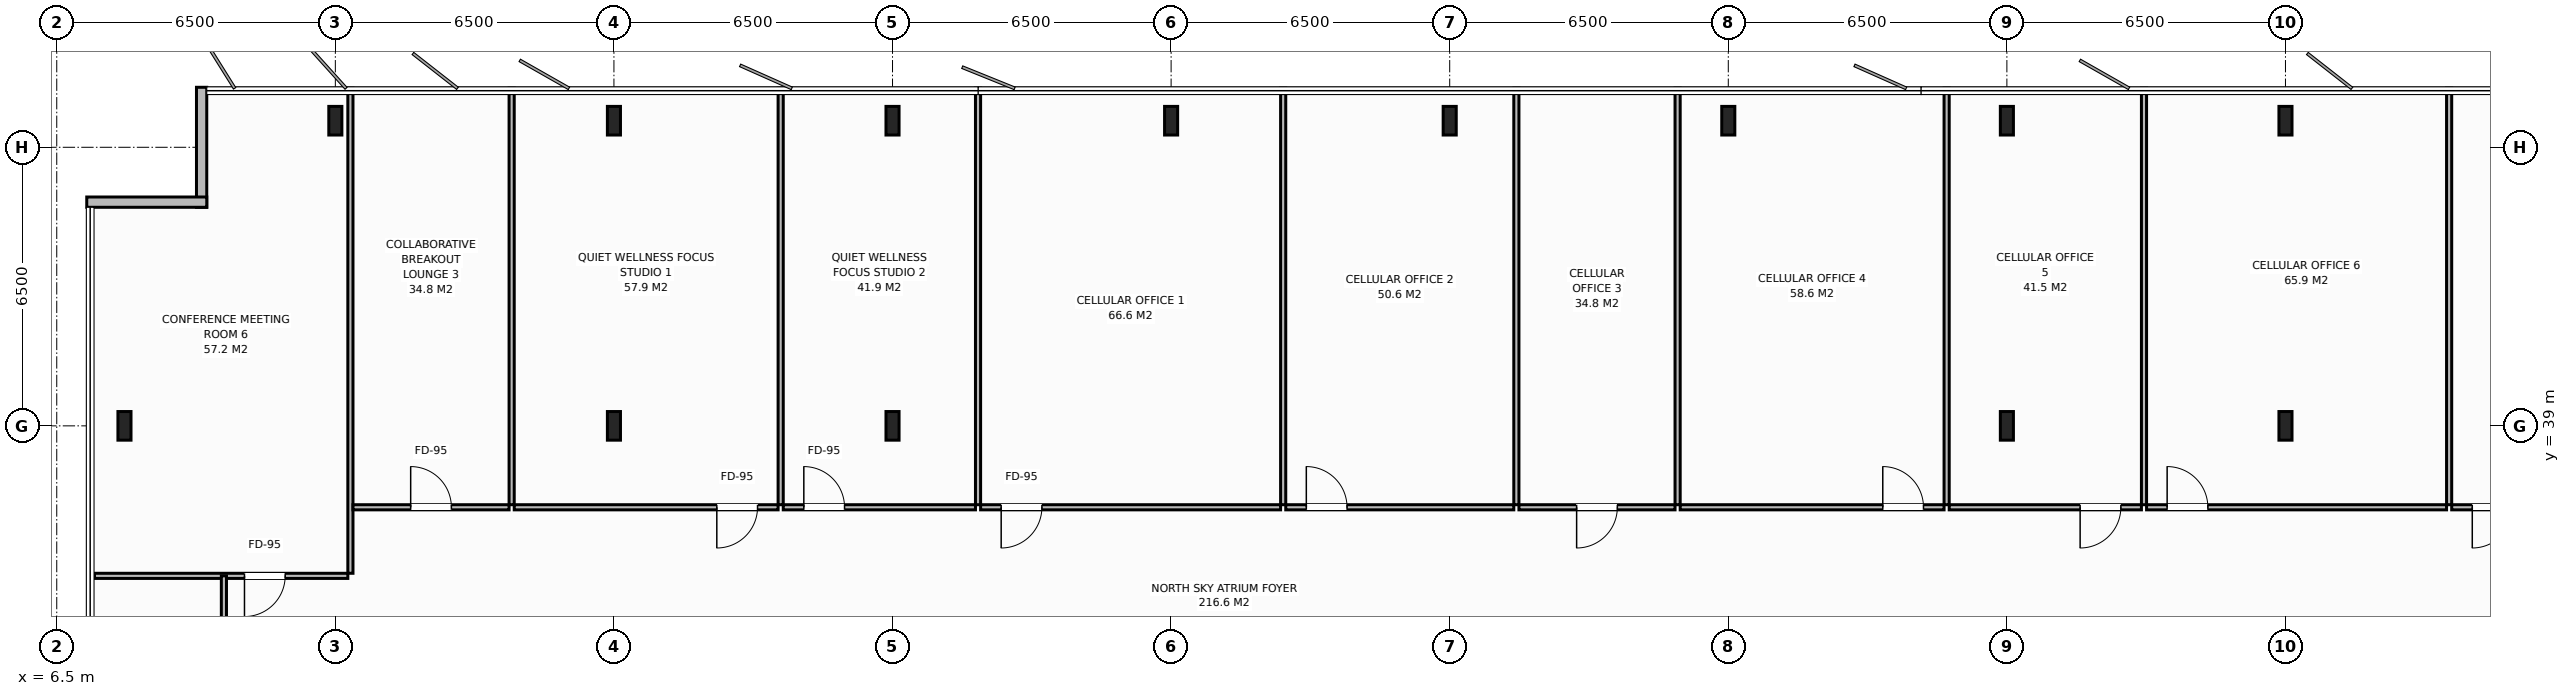
"""IFC4 building model, lengths in metres.
Left out: names, types, materials, properties, quantities, classifications, styles, units other than length and angle.
Written with IfcOpenShell. Run it as: python <this file> out.ifc"""

import sys

from ifc_helpers import new_model, si_unit, direction, frame, frame_2d, origin, origin_2d, place, context, subcontext, project, spatial, rectangle, i_section, extrude, element, fill, save


model = new_model("IFC4")
c1 = context("Model", 3, precision=1e-05, world=origin(), true_north=direction((0.0, 1.0)))
c2 = subcontext(c1, "Body", "Model", "MODEL_VIEW")
j1 = project(units=[si_unit("LENGTHUNIT", "METRE"), si_unit("PLANEANGLEUNIT", "RADIAN")], contexts=[c1])
p1 = place(None, origin())
s1 = spatial("IfcSite", under=j1, at=p1, CompositionType="ELEMENT")
p2 = place(p1, origin())
s2 = spatial("IfcBuilding", under=s1, at=p2, CompositionType="ELEMENT")
p3 = place(p2, frame((0.0, 0.0, 298.4)))
s3 = spatial("IfcBuildingStorey", under=s2, at=p3, CompositionType="ELEMENT", Elevation=298.4)
for number, where, z_axis, x_axis in (
    (1, (19.5, 39.0, 0.0), (0.0, 0.0, 1.0), (1.0, 0.0, 0.0)),
    (2, (58.5, 39.0, 0.0), (0.0, 0.0, 1.0), (1.0, 0.0, 0.0)),
    (3, (26.0, 39.0, 0.0), (0.0, 0.0, 1.0), (1.0, 0.0, 0.0)),
    (4, (52.0, 39.0, 0.0), (0.0, 0.0, 1.0), (1.0, 0.0, 0.0)),
    (5, (13.0, 46.12, 0.0), (0.0, 0.0, 1.0), (1.0, 0.0, 0.0)),
    (6, (19.5, 46.12, 0.0), (0.0, 0.0, 1.0), (1.0, 0.0, 0.0)),
    (7, (26.0, 46.12, 0.0), (0.0, 0.0, 1.0), (1.0, 0.0, 0.0)),
    (8, (32.5, 46.12, 0.0), (0.0, 0.0, 1.0), (1.0, 0.0, 0.0)),
    (9, (39.0, 46.12, 0.0), (0.0, 0.0, 1.0), (1.0, 0.0, 0.0)),
    (10, (45.5, 46.12, 0.0), (0.0, 0.0, 1.0), (1.0, 0.0, 0.0)),
    (11, (52.0, 46.12, 0.0), (0.0, 0.0, 1.0), (1.0, 0.0, 0.0)),
    (12, (58.5, 46.12, 0.0), (0.0, 0.0, 1.0), (1.0, 0.0, 0.0)),
    (13, (8.08, 39.0, 0.0), (0.0, 0.0, 1.0), (1.0, 0.0, 0.0)),
):
    element("IfcColumn", number, at=place(p3, frame(where, z_axis=z_axis, x_axis=x_axis)), inside=s3, PredefinedType="COLUMN", context=c2, shape_type="SweptSolid", body=[
        extrude(i_section(OverallWidth=0.305, OverallDepth=0.668, WebThickness=0.021, FlangeThickness=0.04, at=origin_2d()), origin(), (0.0, 0.0, 1.0), 4.0),
    ])
p4 = place(p3, frame((9.88, 44.1, 0.0), z_axis=(0.0, 0.0, 1.0), x_axis=(0.0, 1.0, 0.0)))
e14 = element("IfcWall", 14, at=p4, inside=s3, PredefinedType="STANDARD", context=c2, shape_type="SweptSolid", body=[
    extrude(rectangle(XDim=2.8, YDim=0.24, at=frame_2d((1.4, 0.0))), origin(), (0.0, 0.0, 1.0), 3.788),
])
p5 = place(p3, frame((7.2, 44.22, 0.0), z_axis=(0.0, 0.0, 1.0), x_axis=(1.0, 0.0, 0.0)))
e15 = element("IfcWall", 15, at=p5, inside=s3, PredefinedType="STANDARD", context=c2, shape_type="SweptSolid", body=[
    extrude(rectangle(XDim=2.8, YDim=0.24, at=frame_2d((1.4, 0.0))), origin(), (0.0, 0.0, 1.0), 3.788),
])
p6 = place(p3, frame((13.352, 35.56, 0.0), z_axis=(0.0, 0.0, 1.0), x_axis=(0.0, 1.0, 0.0)))
e16 = element("IfcWall", 16, at=p6, inside=s3, PredefinedType="PARTITIONING", context=c2, shape_type="SweptSolid", body=[
    extrude(rectangle(XDim=11.32, YDim=0.12, at=frame_2d((5.66, 0.0))), origin(), (0.0, 0.0, 1.0), 3.788),
])
p7 = place(p3, frame((7.38, 35.5, 0.0), z_axis=(0.0, 0.0, 1.0), x_axis=(1.0, 0.0, 0.0)))
e17 = element("IfcWall", 17, at=p7, inside=s3, PredefinedType="PARTITIONING", context=c2, shape_type="SweptSolid", body=[
    extrude(rectangle(XDim=5.912, YDim=0.12, at=frame_2d((2.956, 0.0))), origin(), (0.0, 0.0, 1.0), 3.788),
])
p8 = place(p7, frame((3.5, 0.0, 0.0)))
e18 = element("IfcOpeningElement", 18, at=p8, cuts=e17, PredefinedType="OPENING", context=c2, shape_type="SweptSolid", body=[
    extrude(rectangle(XDim=0.95, YDim=2.15, at=frame_2d((0.475, 1.075))), frame((0.0, 0.07, 0.0), z_axis=(0.0, -1.0, 0.0), x_axis=(1.0, 0.0, 0.0)), (0.0, 0.0, 1.0), 0.14),
])
p9 = place(p3, frame((17.114, 37.16, 0.0), z_axis=(0.0, 0.0, 1.0), x_axis=(0.0, 1.0, 0.0)))
e19 = element("IfcWall", 19, at=p9, inside=s3, PredefinedType="PARTITIONING", context=c2, shape_type="SweptSolid", body=[
    extrude(rectangle(XDim=9.72, YDim=0.12, at=frame_2d((4.86, 0.0))), origin(), (0.0, 0.0, 1.0), 3.788),
])
p10 = place(p3, frame((13.412, 37.1, 0.0), z_axis=(0.0, 0.0, 1.0), x_axis=(1.0, 0.0, 0.0)))
e20 = element("IfcWall", 20, at=p10, inside=s3, PredefinedType="PARTITIONING", context=c2, shape_type="SweptSolid", body=[
    extrude(rectangle(XDim=3.642, YDim=0.12, at=frame_2d((1.821, 0.0))), origin(), (0.0, 0.0, 1.0), 3.788),
])
p11 = place(p10, frame((1.346, 0.0, 0.0)))
e21 = element("IfcOpeningElement", 21, at=p11, cuts=e20, PredefinedType="OPENING", context=c2, shape_type="SweptSolid", body=[
    extrude(rectangle(XDim=0.95, YDim=2.15, at=frame_2d((0.475, 1.075))), frame((0.0, 0.07, 0.0), z_axis=(0.0, -1.0, 0.0), x_axis=(1.0, 0.0, 0.0)), (0.0, 0.0, 1.0), 0.14),
])
p12 = place(p3, frame((23.39, 37.16, 0.0), z_axis=(0.0, 0.0, 1.0), x_axis=(0.0, 1.0, 0.0)))
e22 = element("IfcWall", 22, at=p12, inside=s3, PredefinedType="PARTITIONING", context=c2, shape_type="SweptSolid", body=[
    extrude(rectangle(XDim=9.72, YDim=0.12, at=frame_2d((4.86, 0.0))), origin(), (0.0, 0.0, 1.0), 3.788),
])
p13 = place(p3, frame((17.174, 37.1, 0.0), z_axis=(0.0, 0.0, 1.0), x_axis=(1.0, 0.0, 0.0)))
e23 = element("IfcWall", 23, at=p13, inside=s3, PredefinedType="PARTITIONING", context=c2, shape_type="SweptSolid", body=[
    extrude(rectangle(XDim=6.157, YDim=0.12, at=frame_2d((3.079, 0.0))), origin(), (0.0, 0.0, 1.0), 3.788),
])
p14 = place(p13, frame((4.727, 0.0, 0.0)))
e24 = element("IfcOpeningElement", 24, at=p14, cuts=e23, PredefinedType="OPENING", context=c2, shape_type="SweptSolid", body=[
    extrude(rectangle(XDim=0.95, YDim=2.15, at=frame_2d((0.475, 1.075))), frame((0.0, 0.07, 0.0), z_axis=(0.0, -1.0, 0.0), x_axis=(1.0, 0.0, 0.0)), (0.0, 0.0, 1.0), 0.14),
])
p15 = place(p3, frame((27.995, 37.16, 0.0), z_axis=(0.0, 0.0, 1.0), x_axis=(0.0, 1.0, 0.0)))
e25 = element("IfcWall", 25, at=p15, inside=s3, PredefinedType="PARTITIONING", context=c2, shape_type="SweptSolid", body=[
    extrude(rectangle(XDim=9.72, YDim=0.12, at=frame_2d((4.86, 0.0))), origin(), (0.0, 0.0, 1.0), 3.788),
])
p16 = place(p3, frame((23.45, 37.1, 0.0), z_axis=(0.0, 0.0, 1.0), x_axis=(1.0, 0.0, 0.0)))
e26 = element("IfcWall", 26, at=p16, inside=s3, PredefinedType="PARTITIONING", context=c2, shape_type="SweptSolid", body=[
    extrude(rectangle(XDim=4.485, YDim=0.12, at=frame_2d((2.242, 0.0))), origin(), (0.0, 0.0, 1.0), 3.788),
])
p17 = place(p16, frame((0.48, 0.0, 0.0)))
e27 = element("IfcOpeningElement", 27, at=p17, cuts=e26, PredefinedType="OPENING", context=c2, shape_type="SweptSolid", body=[
    extrude(rectangle(XDim=0.95, YDim=2.15, at=frame_2d((0.475, 1.075))), frame((0.0, 0.07, 0.0), z_axis=(0.0, -1.0, 0.0), x_axis=(1.0, 0.0, 0.0)), (0.0, 0.0, 1.0), 0.14),
])
p18 = place(p3, frame((35.115, 37.16, 0.0), z_axis=(0.0, 0.0, 1.0), x_axis=(0.0, 1.0, 0.0)))
e28 = element("IfcWall", 28, at=p18, inside=s3, PredefinedType="PARTITIONING", context=c2, shape_type="SweptSolid", body=[
    extrude(rectangle(XDim=9.72, YDim=0.12, at=frame_2d((4.86, 0.0))), origin(), (0.0, 0.0, 1.0), 3.788),
])
p19 = place(p3, frame((28.055, 37.1, 0.0), z_axis=(0.0, 0.0, 1.0), x_axis=(1.0, 0.0, 0.0)))
e29 = element("IfcWall", 29, at=p19, inside=s3, PredefinedType="PARTITIONING", context=c2, shape_type="SweptSolid", body=[
    extrude(rectangle(XDim=6.999, YDim=0.12, at=frame_2d((3.5, 0.0))), origin(), (0.0, 0.0, 1.0), 3.788),
])
p20 = place(p19, frame((0.48, 0.0, 0.0)))
e30 = element("IfcOpeningElement", 30, at=p20, cuts=e29, PredefinedType="OPENING", context=c2, shape_type="SweptSolid", body=[
    extrude(rectangle(XDim=0.95, YDim=2.15, at=frame_2d((0.475, 1.075))), frame((0.0, 0.07, 0.0), z_axis=(0.0, -1.0, 0.0), x_axis=(1.0, 0.0, 0.0)), (0.0, 0.0, 1.0), 0.14),
])
p21 = place(p3, frame((40.555, 37.16, 0.0), z_axis=(0.0, 0.0, 1.0), x_axis=(0.0, 1.0, 0.0)))
e31 = element("IfcWall", 31, at=p21, inside=s3, PredefinedType="PARTITIONING", context=c2, shape_type="SweptSolid", body=[
    extrude(rectangle(XDim=9.72, YDim=0.12, at=frame_2d((4.86, 0.0))), origin(), (0.0, 0.0, 1.0), 3.788),
])
p22 = place(p3, frame((35.175, 37.1, 0.0), z_axis=(0.0, 0.0, 1.0), x_axis=(1.0, 0.0, 0.0)))
e32 = element("IfcWall", 32, at=p22, inside=s3, PredefinedType="PARTITIONING", context=c2, shape_type="SweptSolid", body=[
    extrude(rectangle(XDim=5.321, YDim=0.12, at=frame_2d((2.66, 0.0))), origin(), (0.0, 0.0, 1.0), 3.788),
])
p23 = place(p22, frame((0.48, 0.0, 0.0)))
e33 = element("IfcOpeningElement", 33, at=p23, cuts=e32, PredefinedType="OPENING", context=c2, shape_type="SweptSolid", body=[
    extrude(rectangle(XDim=0.95, YDim=2.15, at=frame_2d((0.475, 1.075))), frame((0.0, 0.07, 0.0), z_axis=(0.0, -1.0, 0.0), x_axis=(1.0, 0.0, 0.0)), (0.0, 0.0, 1.0), 0.14),
])
p24 = place(p3, frame((44.318, 37.16, 0.0), z_axis=(0.0, 0.0, 1.0), x_axis=(0.0, 1.0, 0.0)))
e34 = element("IfcWall", 34, at=p24, inside=s3, PredefinedType="PARTITIONING", context=c2, shape_type="SweptSolid", body=[
    extrude(rectangle(XDim=9.72, YDim=0.12, at=frame_2d((4.86, 0.0))), origin(), (0.0, 0.0, 1.0), 3.788),
])
p25 = place(p3, frame((40.615, 37.1, 0.0), z_axis=(0.0, 0.0, 1.0), x_axis=(1.0, 0.0, 0.0)))
e35 = element("IfcWall", 35, at=p25, inside=s3, PredefinedType="PARTITIONING", context=c2, shape_type="SweptSolid", body=[
    extrude(rectangle(XDim=3.642, YDim=0.12, at=frame_2d((1.821, 0.0))), origin(), (0.0, 0.0, 1.0), 3.788),
])
p26 = place(p25, frame((1.346, 0.0, 0.0)))
e36 = element("IfcOpeningElement", 36, at=p26, cuts=e35, PredefinedType="OPENING", context=c2, shape_type="SweptSolid", body=[
    extrude(rectangle(XDim=0.95, YDim=2.15, at=frame_2d((0.475, 1.075))), frame((0.0, 0.07, 0.0), z_axis=(0.0, -1.0, 0.0), x_axis=(1.0, 0.0, 0.0)), (0.0, 0.0, 1.0), 0.14),
])
p27 = place(p3, frame((50.594, 37.16, 0.0), z_axis=(0.0, 0.0, 1.0), x_axis=(0.0, 1.0, 0.0)))
e37 = element("IfcWall", 37, at=p27, inside=s3, PredefinedType="PARTITIONING", context=c2, shape_type="SweptSolid", body=[
    extrude(rectangle(XDim=9.72, YDim=0.12, at=frame_2d((4.86, 0.0))), origin(), (0.0, 0.0, 1.0), 3.788),
])
p28 = place(p3, frame((44.378, 37.1, 0.0), z_axis=(0.0, 0.0, 1.0), x_axis=(1.0, 0.0, 0.0)))
e38 = element("IfcWall", 38, at=p28, inside=s3, PredefinedType="PARTITIONING", context=c2, shape_type="SweptSolid", body=[
    extrude(rectangle(XDim=6.157, YDim=0.12, at=frame_2d((3.078, 0.0))), origin(), (0.0, 0.0, 1.0), 3.788),
])
p29 = place(p28, frame((4.727, 0.0, 0.0)))
e39 = element("IfcOpeningElement", 39, at=p29, cuts=e38, PredefinedType="OPENING", context=c2, shape_type="SweptSolid", body=[
    extrude(rectangle(XDim=0.95, YDim=2.15, at=frame_2d((0.475, 1.075))), frame((0.0, 0.07, 0.0), z_axis=(0.0, -1.0, 0.0), x_axis=(1.0, 0.0, 0.0)), (0.0, 0.0, 1.0), 0.14),
])
p30 = place(p3, frame((55.199, 37.16, 0.0), z_axis=(0.0, 0.0, 1.0), x_axis=(0.0, 1.0, 0.0)))
e40 = element("IfcWall", 40, at=p30, inside=s3, PredefinedType="PARTITIONING", context=c2, shape_type="SweptSolid", body=[
    extrude(rectangle(XDim=9.72, YDim=0.12, at=frame_2d((4.86, 0.0))), origin(), (0.0, 0.0, 1.0), 3.788),
])
p31 = place(p3, frame((50.654, 37.1, 0.0), z_axis=(0.0, 0.0, 1.0), x_axis=(1.0, 0.0, 0.0)))
e41 = element("IfcWall", 41, at=p31, inside=s3, PredefinedType="PARTITIONING", context=c2, shape_type="SweptSolid", body=[
    extrude(rectangle(XDim=4.485, YDim=0.12, at=frame_2d((2.242, 0.0))), origin(), (0.0, 0.0, 1.0), 3.788),
])
p32 = place(p31, frame((3.055, 0.0, 0.0)))
e42 = element("IfcOpeningElement", 42, at=p32, cuts=e41, PredefinedType="OPENING", context=c2, shape_type="SweptSolid", body=[
    extrude(rectangle(XDim=0.95, YDim=2.15, at=frame_2d((0.475, 1.075))), frame((0.0, 0.07, 0.0), z_axis=(0.0, -1.0, 0.0), x_axis=(1.0, 0.0, 0.0)), (0.0, 0.0, 1.0), 0.14),
])
p33 = place(p3, frame((62.319, 37.16, 0.0), z_axis=(0.0, 0.0, 1.0), x_axis=(0.0, 1.0, 0.0)))
e43 = element("IfcWall", 43, at=p33, inside=s3, PredefinedType="PARTITIONING", context=c2, shape_type="SweptSolid", body=[
    extrude(rectangle(XDim=9.72, YDim=0.12, at=frame_2d((4.86, 0.0))), origin(), (0.0, 0.0, 1.0), 3.788),
])
p34 = place(p3, frame((55.259, 37.1, 0.0), z_axis=(0.0, 0.0, 1.0), x_axis=(1.0, 0.0, 0.0)))
e44 = element("IfcWall", 44, at=p34, inside=s3, PredefinedType="PARTITIONING", context=c2, shape_type="SweptSolid", body=[
    extrude(rectangle(XDim=6.999, YDim=0.12, at=frame_2d((3.5, 0.0))), origin(), (0.0, 0.0, 1.0), 3.788),
])
p35 = place(p34, frame((0.48, 0.0, 0.0)))
e45 = element("IfcOpeningElement", 45, at=p35, cuts=e44, PredefinedType="OPENING", context=c2, shape_type="SweptSolid", body=[
    extrude(rectangle(XDim=0.95, YDim=2.15, at=frame_2d((0.475, 1.075))), frame((0.0, 0.07, 0.0), z_axis=(0.0, -1.0, 0.0), x_axis=(1.0, 0.0, 0.0)), (0.0, 0.0, 1.0), 0.14),
])
p36 = place(p3, frame((62.379, 37.1, 0.0), z_axis=(0.0, 0.0, 1.0), x_axis=(1.0, 0.0, 0.0)))
e46 = element("IfcWall", 46, at=p36, inside=s3, PredefinedType="PARTITIONING", context=c2, shape_type="SweptSolid", body=[
    extrude(rectangle(XDim=5.321, YDim=0.12, at=frame_2d((2.66, 0.0))), origin(), (0.0, 0.0, 1.0), 3.788),
])
p37 = place(p36, frame((0.48, 0.0, 0.0)))
e47 = element("IfcOpeningElement", 47, at=p37, cuts=e46, PredefinedType="OPENING", context=c2, shape_type="SweptSolid", body=[
    extrude(rectangle(XDim=0.95, YDim=2.15, at=frame_2d((0.475, 1.075))), frame((0.0, 0.07, 0.0), z_axis=(0.0, -1.0, 0.0), x_axis=(1.0, 0.0, 0.0)), (0.0, 0.0, 1.0), 0.14),
])
p38 = place(p3, frame((10.4, 29.167, 0.0), z_axis=(0.0, 0.0, 1.0), x_axis=(0.0, 1.0, 0.0)))
e48 = element("IfcWall", 48, at=p38, inside=s3, PredefinedType="PARTITIONING", context=c2, shape_type="SweptSolid", body=[
    extrude(rectangle(XDim=6.333, YDim=0.12, at=frame_2d((3.167, 0.0))), origin(), (0.0, 0.0, 1.0), 3.788),
])
p39 = place(p38, frame((1.642, 0.0, 0.0)))
e49 = element("IfcOpeningElement", 49, at=p39, cuts=e48, PredefinedType="OPENING", context=c2, shape_type="SweptSolid", body=[
    extrude(rectangle(XDim=0.95, YDim=2.15, at=frame_2d((0.475, 1.075))), frame((0.0, 0.07, 0.0), z_axis=(0.0, -1.0, 0.0), x_axis=(1.0, 0.0, 0.0)), (0.0, 0.0, 1.0), 0.14),
])
p40 = place(p8, origin())
e50 = element("IfcDoor", 50, at=p40, inside=s3, OperationType="SINGLE_SWING_RIGHT", PredefinedType="DOOR", context=c2, shape_type="SweptSolid", body=[
    extrude(rectangle(XDim=0.95, YDim=2.15, at=frame_2d((0.475, 1.075))), frame((0.0, 0.025, 0.0), z_axis=(0.0, -1.0, 0.0), x_axis=(1.0, 0.0, 0.0)), (0.0, 0.0, 1.0), 0.05),
])
fill(e18, e50)
p41 = place(p11, origin())
e51 = element("IfcDoor", 51, at=p41, inside=s3, OperationType="SINGLE_SWING_LEFT", PredefinedType="DOOR", context=c2, shape_type="SweptSolid", body=[
    extrude(rectangle(XDim=0.95, YDim=2.15, at=frame_2d((0.475, 1.075))), frame((0.0, 0.025, 0.0), z_axis=(0.0, -1.0, 0.0), x_axis=(1.0, 0.0, 0.0)), (0.0, 0.0, 1.0), 0.05),
])
fill(e21, e51)
p42 = place(p14, origin())
e52 = element("IfcDoor", 52, at=p42, inside=s3, OperationType="SINGLE_SWING_RIGHT", PredefinedType="DOOR", context=c2, shape_type="SweptSolid", body=[
    extrude(rectangle(XDim=0.95, YDim=2.15, at=frame_2d((0.475, 1.075))), frame((0.0, 0.025, 0.0), z_axis=(0.0, -1.0, 0.0), x_axis=(1.0, 0.0, 0.0)), (0.0, 0.0, 1.0), 0.05),
])
fill(e24, e52)
p43 = place(p17, origin())
e53 = element("IfcDoor", 53, at=p43, inside=s3, OperationType="SINGLE_SWING_LEFT", PredefinedType="DOOR", context=c2, shape_type="SweptSolid", body=[
    extrude(rectangle(XDim=0.95, YDim=2.15, at=frame_2d((0.475, 1.075))), frame((0.0, 0.025, 0.0), z_axis=(0.0, -1.0, 0.0), x_axis=(1.0, 0.0, 0.0)), (0.0, 0.0, 1.0), 0.05),
])
fill(e27, e53)
p44 = place(p20, origin())
e54 = element("IfcDoor", 54, at=p44, inside=s3, OperationType="SINGLE_SWING_RIGHT", PredefinedType="DOOR", context=c2, shape_type="SweptSolid", body=[
    extrude(rectangle(XDim=0.95, YDim=2.15, at=frame_2d((0.475, 1.075))), frame((0.0, 0.025, 0.0), z_axis=(0.0, -1.0, 0.0), x_axis=(1.0, 0.0, 0.0)), (0.0, 0.0, 1.0), 0.05),
])
fill(e30, e54)
p45 = place(p23, origin())
e55 = element("IfcDoor", 55, at=p45, inside=s3, OperationType="SINGLE_SWING_LEFT", PredefinedType="DOOR", context=c2, shape_type="SweptSolid", body=[
    extrude(rectangle(XDim=0.95, YDim=2.15, at=frame_2d((0.475, 1.075))), frame((0.0, 0.025, 0.0), z_axis=(0.0, -1.0, 0.0), x_axis=(1.0, 0.0, 0.0)), (0.0, 0.0, 1.0), 0.05),
])
fill(e33, e55)
p46 = place(p26, origin())
e56 = element("IfcDoor", 56, at=p46, inside=s3, OperationType="SINGLE_SWING_RIGHT", PredefinedType="DOOR", context=c2, shape_type="SweptSolid", body=[
    extrude(rectangle(XDim=0.95, YDim=2.15, at=frame_2d((0.475, 1.075))), frame((0.0, 0.025, 0.0), z_axis=(0.0, -1.0, 0.0), x_axis=(1.0, 0.0, 0.0)), (0.0, 0.0, 1.0), 0.05),
])
fill(e36, e56)
p47 = place(p29, origin())
e57 = element("IfcDoor", 57, at=p47, inside=s3, OperationType="SINGLE_SWING_LEFT", PredefinedType="DOOR", context=c2, shape_type="SweptSolid", body=[
    extrude(rectangle(XDim=0.95, YDim=2.15, at=frame_2d((0.475, 1.075))), frame((0.0, 0.025, 0.0), z_axis=(0.0, -1.0, 0.0), x_axis=(1.0, 0.0, 0.0)), (0.0, 0.0, 1.0), 0.05),
])
fill(e39, e57)
p48 = place(p32, origin())
e58 = element("IfcDoor", 58, at=p48, inside=s3, OperationType="SINGLE_SWING_RIGHT", PredefinedType="DOOR", context=c2, shape_type="SweptSolid", body=[
    extrude(rectangle(XDim=0.95, YDim=2.15, at=frame_2d((0.475, 1.075))), frame((0.0, 0.025, 0.0), z_axis=(0.0, -1.0, 0.0), x_axis=(1.0, 0.0, 0.0)), (0.0, 0.0, 1.0), 0.05),
])
fill(e42, e58)
p49 = place(p35, origin())
e59 = element("IfcDoor", 59, at=p49, inside=s3, OperationType="SINGLE_SWING_LEFT", PredefinedType="DOOR", context=c2, shape_type="SweptSolid", body=[
    extrude(rectangle(XDim=0.95, YDim=2.15, at=frame_2d((0.475, 1.075))), frame((0.0, 0.025, 0.0), z_axis=(0.0, -1.0, 0.0), x_axis=(1.0, 0.0, 0.0)), (0.0, 0.0, 1.0), 0.05),
])
fill(e45, e59)
p50 = place(p37, origin())
e60 = element("IfcDoor", 60, at=p50, inside=s3, OperationType="SINGLE_SWING_RIGHT", PredefinedType="DOOR", context=c2, shape_type="SweptSolid", body=[
    extrude(rectangle(XDim=0.95, YDim=2.15, at=frame_2d((0.475, 1.075))), frame((0.0, 0.025, 0.0), z_axis=(0.0, -1.0, 0.0), x_axis=(1.0, 0.0, 0.0)), (0.0, 0.0, 1.0), 0.05),
])
fill(e47, e60)
save(model, sys.argv[1])
